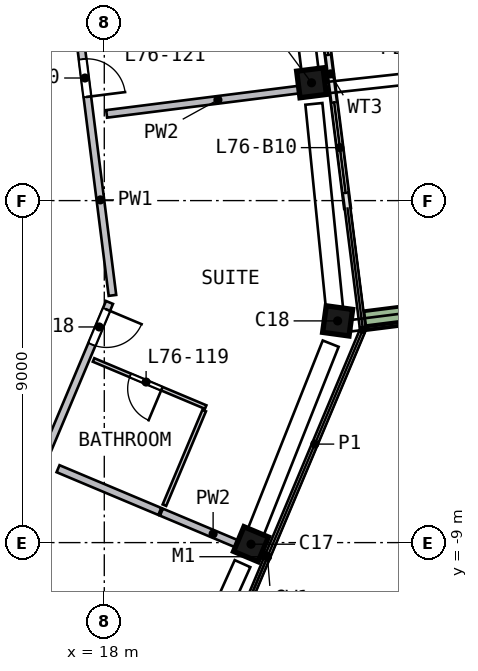
"""IFC4 building model, lengths in metres.
Left out: names, types, materials, properties, quantities, classifications, styles, units other than length and angle.
Written with IfcOpenShell. Run it as: python <this file> out.ifc"""

import sys

from ifc_helpers import new_model, si_unit, direction, frame, frame_2d, origin, origin_2d, place, context, subcontext, project, spatial, rectangle, extrude, element, fill, save


model = new_model("IFC4")
c1 = context("Model", 3, precision=1e-05, world=origin(), true_north=direction((0.0, 1.0)))
c2 = subcontext(c1, "Body", "Model", "MODEL_VIEW")
j1 = project(units=[si_unit("LENGTHUNIT", "METRE"), si_unit("PLANEANGLEUNIT", "RADIAN")], contexts=[c1])
p1 = place(None, origin())
s1 = spatial("IfcSite", under=j1, at=p1, CompositionType="ELEMENT")
p2 = place(p1, origin())
s2 = spatial("IfcBuilding", under=s1, at=p2, CompositionType="ELEMENT")
p3 = place(p2, frame((0.0, 0.0, 306.5)))
s3 = spatial("IfcBuildingStorey", under=s2, at=p3, CompositionType="ELEMENT", Elevation=306.5)
p4 = place(p3, frame((21.81, -9.168, 0.0), z_axis=(0.042739143, 0.104110118, 0.993647044), x_axis=(0.385137856, 0.915971714, -0.11253733)))
e1 = element("IfcColumn", 1, at=p4, inside=s3, PredefinedType="COLUMN", context=c2, shape_type="SweptSolid", body=[
    extrude(rectangle(XDim=0.7, YDim=0.7, at=origin_2d()), origin(), (0.0, 0.0, 1.0), 3.21),
])
p5 = place(p3, frame((24.123, -3.304, 0.0), z_axis=(0.014747795, 0.114865555, 0.993271568), x_axis=(-0.134849795, -0.984075654, 0.115804315)))
e2 = element("IfcColumn", 2, at=p5, inside=s3, PredefinedType="COLUMN", context=c2, shape_type="SweptSolid", body=[
    extrude(rectangle(XDim=0.7, YDim=0.7, at=origin_2d()), origin(), (0.0, 0.0, 1.0), 3.212),
])
p6 = place(p3, frame((23.472, 2.965, 0.0), z_axis=(-0.014981476, 0.111562563, 0.993644479), x_axis=(-0.123885828, 0.985891755, -0.112559981)))
e3 = element("IfcColumn", 3, at=p6, inside=s3, PredefinedType="COLUMN", context=c2, shape_type="SweptSolid", body=[
    extrude(rectangle(XDim=0.7, YDim=0.7, at=origin_2d()), origin(), (0.0, 0.0, 1.0), 3.21),
])
p7 = place(p3, frame((24.4, -0.193, 0.0), z_axis=(0.0, 0.0, 1.0), x_axis=(-0.125301284, 0.992118737, 0.0)))
e4 = element("IfcWall", 4, at=p7, inside=s3, PredefinedType="SOLIDWALL", context=c2, shape_type="SweptSolid", body=[
    extrude(rectangle(XDim=3.25, YDim=0.15, at=frame_2d((1.625, 0.0))), origin(), (0.0, 0.0, 1.0), 2.525),
])
p8 = place(p7, frame((0.4, 0.0, 0.0)))
e5 = element("IfcOpeningElement", 5, at=p8, cuts=e4, PredefinedType="OPENING", context=c2, shape_type="SweptSolid", body=[
    extrude(rectangle(XDim=2.4, YDim=2.4, at=frame_2d((1.2, 1.2))), frame((0.0, 0.085, 0.0), z_axis=(0.0, -1.0, 0.0), x_axis=(1.0, 0.0, 0.0)), (0.0, 0.0, 1.0), 0.17),
])
p9 = place(p3, frame((23.993, 3.031, 0.0), z_axis=(0.0, 0.0, 1.0), x_axis=(-0.125340977, 0.992113723, 0.0)))
e6 = element("IfcWall", 6, at=p9, inside=s3, PredefinedType="SOLIDWALL", context=c2, shape_type="SweptSolid", body=[
    extrude(rectangle(XDim=3.611, YDim=0.15, at=frame_2d((1.806, 0.0))), origin(), (0.0, 0.0, 1.0), 2.525),
])
p10 = place(p9, frame((0.811, 0.0, 0.0)))
e7 = element("IfcOpeningElement", 7, at=p10, cuts=e6, PredefinedType="OPENING", context=c2, shape_type="SweptSolid", body=[
    extrude(rectangle(XDim=2.4, YDim=2.4, at=frame_2d((1.2, 1.2))), frame((0.0, 0.085, 0.0), z_axis=(0.0, -1.0, 0.0), x_axis=(1.0, 0.0, 0.0)), (0.0, 0.0, 1.0), 0.17),
])
p11 = place(p3, frame((24.851, -3.16, 0.0), z_axis=(0.0, 0.0, 1.0), x_axis=(0.992117376, 0.125312056, 0.0)))
e8 = element("IfcWall", 8, at=p11, inside=s3, PredefinedType="SOLIDWALL", context=c2, shape_type="SweptSolid", body=[
    extrude(rectangle(XDim=3.199, YDim=0.5, at=frame_2d((1.6, 0.0))), origin(), (0.0, 0.0, 1.0), 0.7),
])
p12 = place(p3, frame((18.137, -2.68, 0.0), z_axis=(0.0, 0.0, 1.0), x_axis=(-0.387519326, -0.92186158, 0.0)))
e9 = element("IfcWall", 9, at=p12, inside=s3, PredefinedType="SOLIDWALL", context=c2, shape_type="SweptSolid", body=[
    extrude(rectangle(XDim=9.115, YDim=0.2, at=frame_2d((4.558, 0.0))), origin(), (0.0, 0.0, 1.0), 3.19),
])
p13 = place(p12, frame((0.2, 0.0, 0.0)))
e10 = element("IfcOpeningElement", 10, at=p13, cuts=e9, PredefinedType="OPENING", context=c2, shape_type="SweptSolid", body=[
    extrude(rectangle(XDim=1.0, YDim=2.1, at=frame_2d((0.5, 1.05))), frame((0.0, 0.11, 0.0), z_axis=(0.0, -1.0, 0.0), x_axis=(1.0, 0.0, 0.0)), (0.0, 0.0, 1.0), 0.22),
])
p14 = place(p3, frame((17.022, 6.947, 0.0), z_axis=(0.0, 0.0, 1.0), x_axis=(0.125326077, -0.992115605, 0.0)))
e11 = element("IfcWall", 11, at=p14, inside=s3, PredefinedType="SOLIDWALL", context=c2, shape_type="SweptSolid", body=[
    extrude(rectangle(XDim=9.516, YDim=0.2, at=frame_2d((4.758, 0.0))), origin(), (0.0, 0.0, 1.0), 3.19),
])
p15 = place(p14, frame((3.25, 0.0, 0.0)))
e12 = element("IfcOpeningElement", 12, at=p15, cuts=e11, PredefinedType="OPENING", context=c2, shape_type="SweptSolid", body=[
    extrude(rectangle(XDim=1.0, YDim=2.1, at=frame_2d((0.5, 1.05))), frame((0.0, 0.11, 0.0), z_axis=(0.0, -1.0, 0.0), x_axis=(1.0, 0.0, 0.0)), (0.0, 0.0, 1.0), 0.22),
])
p16 = place(p3, frame((16.783, -7.055, 0.0), z_axis=(0.0, 0.0, 1.0), x_axis=(0.921836194, -0.387579711, 0.0)))
e13 = element("IfcWall", 13, at=p16, inside=s3, PredefinedType="SOLIDWALL", context=c2, shape_type="SweptSolid", body=[
    extrude(rectangle(XDim=2.905, YDim=0.2, at=frame_2d((1.452, 0.0))), origin(), (0.0, 0.0, 1.0), 3.19),
])
p17 = place(p3, frame((19.503, -8.198, 0.0), z_axis=(0.0, 0.0, 1.0), x_axis=(0.92188582, -0.387461655, 0.0)))
e14 = element("IfcWall", 14, at=p17, inside=s3, PredefinedType="SOLIDWALL", context=c2, shape_type="SweptSolid", body=[
    extrude(rectangle(XDim=2.952, YDim=0.2, at=frame_2d((1.476, 0.0))), origin(), (0.0, 0.0, 1.0), 3.19),
])
p18 = place(p3, frame((18.062, 2.282, 0.0), z_axis=(0.0, 0.0, 1.0), x_axis=(0.992116053, 0.125322535, 0.0)))
e15 = element("IfcWall", 15, at=p18, inside=s3, PredefinedType="SOLIDWALL", context=c2, shape_type="SweptSolid", body=[
    extrude(rectangle(XDim=5.903, YDim=0.2, at=frame_2d((2.951, 0.0))), origin(), (0.0, 0.0, 1.0), 3.19),
])
p19 = place(p3, frame((20.667, -5.434, 0.0), z_axis=(0.0, 0.0, 1.0), x_axis=(-0.92185784, 0.387528221, 0.0)))
e16 = element("IfcWall", 16, at=p19, inside=s3, PredefinedType="PARTITIONING", context=c2, shape_type="SweptSolid", body=[
    extrude(rectangle(XDim=3.2, YDim=0.1, at=frame_2d((1.6, 0.0))), origin(), (0.0, 0.0, 1.0), 3.19),
])
p20 = place(p19, frame((1.25, 0.0, 0.0)))
e17 = element("IfcOpeningElement", 17, at=p20, cuts=e16, PredefinedType="OPENING", context=c2, shape_type="SweptSolid", body=[
    extrude(rectangle(XDim=0.9, YDim=2.1, at=frame_2d((0.45, 1.05))), frame((0.0, 0.06, 0.0), z_axis=(0.0, -1.0, 0.0), x_axis=(1.0, 0.0, 0.0)), (0.0, 0.0, 1.0), 0.12),
])
p21 = place(p3, frame((20.629, -5.526, 0.0), z_axis=(0.0, 0.0, 1.0), x_axis=(-0.3875476, -0.921849693, 0.0)))
e18 = element("IfcWall", 18, at=p21, inside=s3, PredefinedType="PARTITIONING", context=c2, shape_type="SweptSolid", body=[
    extrude(rectangle(XDim=2.7, YDim=0.1, at=frame_2d((1.35, 0.0))), origin(), (0.0, 0.0, 1.0), 3.19),
])
p22 = place(p8, origin())
e19 = element("IfcDoor", 19, at=p22, inside=s3, OperationType="SLIDING_TO_RIGHT", PredefinedType="DOOR", context=c2, shape_type="SweptSolid", body=[
    extrude(rectangle(XDim=2.4, YDim=2.4, at=frame_2d((1.2, 1.2))), frame((0.0, 0.025, 0.0), z_axis=(0.0, -1.0, 0.0), x_axis=(1.0, 0.0, 0.0)), (0.0, 0.0, 1.0), 0.05),
])
fill(e5, e19)
p23 = place(p10, origin())
e20 = element("IfcDoor", 20, at=p23, inside=s3, OperationType="SLIDING_TO_LEFT", PredefinedType="DOOR", context=c2, shape_type="SweptSolid", body=[
    extrude(rectangle(XDim=2.4, YDim=2.4, at=frame_2d((1.2, 1.2))), frame((0.0, 0.025, 0.0), z_axis=(0.0, -1.0, 0.0), x_axis=(1.0, 0.0, 0.0)), (0.0, 0.0, 1.0), 0.05),
])
fill(e7, e20)
p24 = place(p13, origin())
e21 = element("IfcDoor", 21, at=p24, inside=s3, OperationType="SINGLE_SWING_LEFT", PredefinedType="DOOR", context=c2, shape_type="SweptSolid", body=[
    extrude(rectangle(XDim=1.0, YDim=2.1, at=frame_2d((0.5, 1.05))), frame((0.0, 0.025, 0.0), z_axis=(0.0, -1.0, 0.0), x_axis=(1.0, 0.0, 0.0)), (0.0, 0.0, 1.0), 0.05),
])
fill(e10, e21)
p25 = place(p20, origin())
e22 = element("IfcDoor", 22, at=p25, inside=s3, OperationType="SINGLE_SWING_LEFT", PredefinedType="DOOR", context=c2, shape_type="SweptSolid", body=[
    extrude(rectangle(XDim=0.9, YDim=2.1, at=frame_2d((0.45, 1.05))), frame((0.0, 0.025, 0.0), z_axis=(0.0, -1.0, 0.0), x_axis=(1.0, 0.0, 0.0)), (0.0, 0.0, 1.0), 0.05),
])
fill(e17, e22)
p26 = place(p15, origin())
e23 = element("IfcDoor", 23, at=p26, inside=s3, OperationType="SINGLE_SWING_RIGHT", PredefinedType="DOOR", context=c2, shape_type="SweptSolid", body=[
    extrude(rectangle(XDim=1.0, YDim=2.1, at=frame_2d((0.5, 1.05))), frame((0.0, 0.025, 0.0), z_axis=(0.0, -1.0, 0.0), x_axis=(1.0, 0.0, 0.0)), (0.0, 0.0, 1.0), 0.05),
])
fill(e12, e23)
save(model, sys.argv[1])
